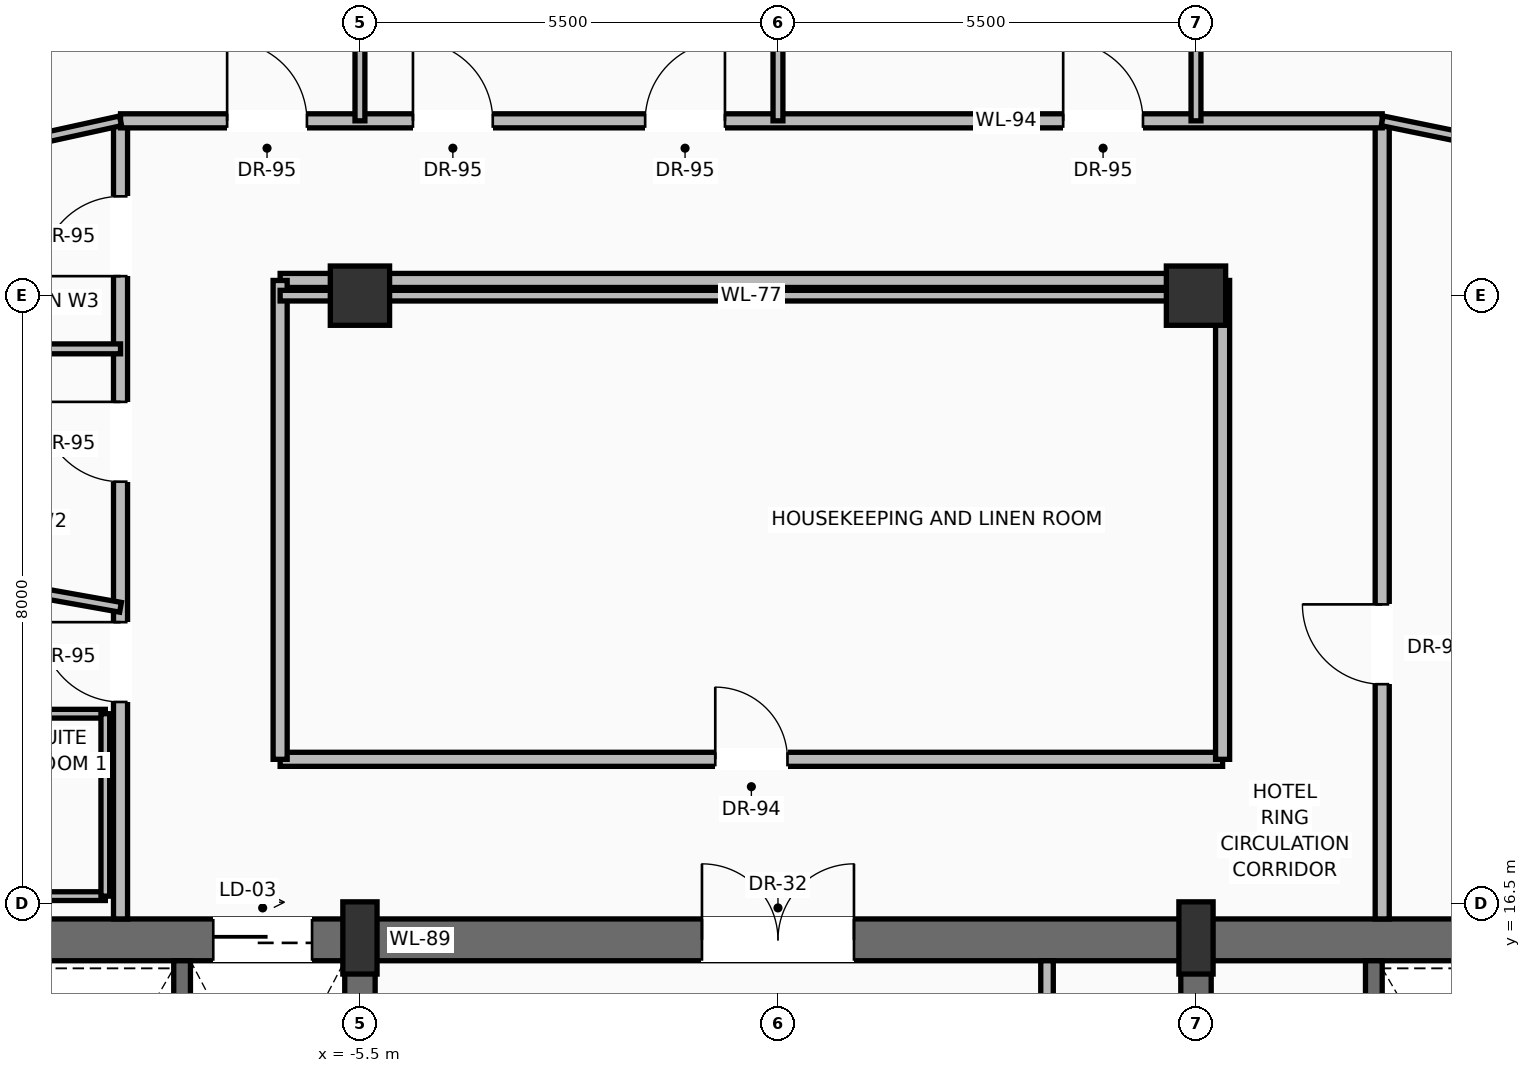
"""IFC4 building model, lengths in metres.
Left out: names, types, materials, properties, quantities, classifications, styles, units other than length and angle.
Written with IfcOpenShell. Run it as: python <this file> out.ifc"""

import sys

from ifc_helpers import new_model, si_unit, direction, frame, frame_2d, origin, origin_2d, place, context, subcontext, project, spatial, rectangle, extrude, source, transform, mapped, element, fill, save


model = new_model("IFC4")
c1 = context("Model", 3, precision=1e-05, world=origin(), true_north=direction((0.0, 1.0)))
c2 = subcontext(c1, "Body", "Model", "MODEL_VIEW")
j1 = project(units=[si_unit("LENGTHUNIT", "METRE"), si_unit("PLANEANGLEUNIT", "RADIAN")], contexts=[c1])
p1 = place(None, origin())
s1 = spatial("IfcSite", under=j1, at=p1, CompositionType="ELEMENT")
p2 = place(p1, origin())
s2 = spatial("IfcBuilding", under=s1, at=p2, CompositionType="ELEMENT")
p3 = place(p2, frame((0.0, 0.0, 233.8)))
s3 = spatial("IfcBuildingStorey", under=s2, at=p3, CompositionType="ELEMENT", Elevation=233.8)
p4 = place(p3, frame((-10.7, 16.025, 0.0), z_axis=(0.0, 0.0, 1.0), x_axis=(1.0, 0.0, 0.0)))
e1 = element("IfcWall", 1, at=p4, inside=s3, PredefinedType="SHEAR", context=c2, shape_type="SweptSolid", body=[
    extrude(rectangle(XDim=21.4, YDim=0.55, at=frame_2d((10.7, 0.0))), origin(), (0.0, 0.0, 1.0), 3.24),
])
p5 = place(p4, frame((3.27, 0.0, 0.0)))
e2 = element("IfcOpeningElement", 2, at=p5, cuts=e1, PredefinedType="OPENING", context=c2, shape_type="SweptSolid", body=[
    extrude(rectangle(XDim=1.3, YDim=2.3, at=frame_2d((0.65, 1.15))), frame((0.0, 0.285, 0.0), z_axis=(0.0, -1.0, 0.0), x_axis=(1.0, 0.0, 0.0)), (0.0, 0.0, 1.0), 0.57),
])
p6 = place(p4, frame((9.7, 0.0, 0.0)))
e3 = element("IfcOpeningElement", 3, at=p6, cuts=e1, PredefinedType="OPENING", context=c2, shape_type="SweptSolid", body=[
    extrude(rectangle(XDim=2.0, YDim=2.4, at=frame_2d((1.0, 1.2))), frame((0.0, 0.285, 0.0), z_axis=(0.0, -1.0, 0.0), x_axis=(1.0, 0.0, 0.0)), (0.0, 0.0, 1.0), 0.57),
])
p7 = place(p3, frame((-5.5, 0.575, 0.0), z_axis=(0.0, 0.0, 1.0), x_axis=(0.0, 1.0, 0.0)))
e4 = element("IfcWall", 4, at=p7, inside=s3, PredefinedType="SHEAR", context=c2, shape_type="SweptSolid", body=[
    extrude(rectangle(XDim=15.45, YDim=0.4, at=frame_2d((7.725, 0.0))), origin(), (0.0, 0.0, 1.0), 3.24),
])
p8 = place(p7, frame((8.925, 0.0, 0.0)))
e5 = element("IfcOpeningElement", 5, at=p8, cuts=e4, PredefinedType="OPENING", context=c2, shape_type="SweptSolid", body=[
    extrude(rectangle(XDim=1.1, YDim=2.2, at=frame_2d((0.55, 1.1))), frame((0.0, 0.21, 0.0), z_axis=(0.0, -1.0, 0.0), x_axis=(1.0, 0.0, 0.0)), (0.0, 0.0, 1.0), 0.42),
])
p9 = place(p3, frame((5.5, 0.575, 0.0), z_axis=(0.0, 0.0, 1.0), x_axis=(0.0, 1.0, 0.0)))
e6 = element("IfcWall", 6, at=p9, inside=s3, PredefinedType="SHEAR", context=c2, shape_type="SweptSolid", body=[
    extrude(rectangle(XDim=15.45, YDim=0.4, at=frame_2d((7.725, 0.0))), origin(), (0.0, 0.0, 1.0), 3.24),
])
p10 = place(p9, frame((8.925, 0.0, 0.0)))
e7 = element("IfcOpeningElement", 7, at=p10, cuts=e6, PredefinedType="OPENING", context=c2, shape_type="SweptSolid", body=[
    extrude(rectangle(XDim=1.1, YDim=2.2, at=frame_2d((0.55, 1.1))), frame((0.0, 0.21, 0.0), z_axis=(0.0, -1.0, 0.0), x_axis=(1.0, 0.0, 0.0)), (0.0, 0.0, 1.0), 0.42),
])
m1 = source(origin(), c2, "Body", "SweptSolid", [
    extrude(rectangle(XDim=0.45, YDim=0.95, at=origin_2d()), origin(), (0.0, 0.0, 1.0), 3.45),
])
for number, where, z_axis, x_axis in (
    (8, (-5.5, 16.05, 0.0), (0.0, 0.0, 1.0), (1.0, 0.0, 0.0)),
    (9, (5.5, 16.05, 0.0), (0.0, 0.0, 1.0), (1.0, 0.0, 0.0)),
):
    element("IfcColumn", number, at=place(p3, frame(where, z_axis=z_axis, x_axis=x_axis)), inside=s3, PredefinedType="PILASTER", context=c2, shape_type="MappedRepresentation", body=[
        mapped(m1, transform((0.0, 0.0, 0.0), scale=1.0)),
    ])
m2 = source(origin(), c2, "Body", "SweptSolid", [
    extrude(rectangle(XDim=0.78, YDim=0.78, at=origin_2d()), origin(), (0.0, 0.0, 1.0), 3.45),
])
for number, where, z_axis, x_axis in (
    (10, (-5.5, 24.5, 0.0), (0.0, 0.0, 1.0), (1.0, 0.0, 0.0)),
    (11, (5.5, 24.5, 0.0), (0.0, 0.0, 1.0), (1.0, 0.0, 0.0)),
):
    element("IfcColumn", number, at=place(p3, frame(where, z_axis=z_axis, x_axis=x_axis)), inside=s3, PredefinedType="COLUMN", context=c2, shape_type="MappedRepresentation", body=[
        mapped(m2, transform((0.0, 0.0, 0.0), scale=1.0)),
    ])
p11 = place(p3, frame((-19.509, 15.219, 0.0), z_axis=(0.0, 0.0, 1.0), x_axis=(0.509744081024, 0.860326084611, 0.0)))
e12 = element("IfcWall", 12, at=p11, inside=s3, PredefinedType="SOLIDWALL", context=c2, shape_type="SweptSolid", body=[
    extrude(rectangle(XDim=19.511, YDim=0.28, at=frame_2d((9.756, 0.0))), origin(), (0.0, 0.0, 1.0), 2.82),
])
p12 = place(p11, frame((4.683, 0.0, 0.0)))
e13 = element("IfcOpeningElement", 13, at=p12, cuts=e12, PredefinedType="OPENING", context=c2, shape_type="SweptSolid", body=[
    extrude(rectangle(XDim=1.6, YDim=2.35, at=frame_2d((0.8, 1.175))), frame((0.0, 0.15, 0.0), z_axis=(0.0, -1.0, 0.0), x_axis=(1.0, 0.0, 0.0)), (0.0, 0.0, 1.0), 0.3),
])
p13 = place(p11, frame((13.268, 0.0, 0.9)))
e14 = element("IfcOpeningElement", 14, at=p13, cuts=e12, PredefinedType="OPENING", context=c2, shape_type="SweptSolid", body=[
    extrude(rectangle(XDim=2.0, YDim=1.75, at=frame_2d((1.0, 0.875))), frame((0.0, 0.15, 0.0), z_axis=(0.0, -1.0, 0.0), x_axis=(1.0, 0.0, 0.0)), (0.0, 0.0, 1.0), 0.3),
])
p14 = place(p3, frame((8.625, 32.099, 0.0), z_axis=(0.0, 0.0, 1.0), x_axis=(0.526909754256, -0.849921238039, 0.0)))
e15 = element("IfcWall", 15, at=p14, inside=s3, PredefinedType="SOLIDWALL", context=c2, shape_type="SweptSolid", body=[
    extrude(rectangle(XDim=19.572, YDim=0.28, at=frame_2d((9.786, 0.0))), origin(), (0.0, 0.0, 1.0), 2.82),
])
p15 = place(p14, frame((4.697, 0.0, 0.0)))
e16 = element("IfcOpeningElement", 16, at=p15, cuts=e15, PredefinedType="OPENING", context=c2, shape_type="SweptSolid", body=[
    extrude(rectangle(XDim=1.6, YDim=2.35, at=frame_2d((0.8, 1.175))), frame((0.0, 0.15, 0.0), z_axis=(0.0, -1.0, 0.0), x_axis=(1.0, 0.0, 0.0)), (0.0, 0.0, 1.0), 0.3),
])
p16 = place(p14, frame((13.309, 0.0, 0.9)))
e17 = element("IfcOpeningElement", 17, at=p16, cuts=e15, PredefinedType="OPENING", context=c2, shape_type="SweptSolid", body=[
    extrude(rectangle(XDim=2.0, YDim=1.75, at=frame_2d((1.0, 0.875))), frame((0.0, 0.15, 0.0), z_axis=(0.0, -1.0, 0.0), x_axis=(1.0, 0.0, 0.0)), (0.0, 0.0, 1.0), 0.3),
])
for number, where, z_axis, x_axis in (
    (18, (-7.84, 11.87, 0.0), (0.0, 0.0, 1.0), (0.0, 1.0, 0.0)),
    (19, (7.84, 11.87, 0.0), (0.0, 0.0, 1.0), (0.0, 1.0, 0.0)),
):
    element("IfcWall", number, at=place(p3, frame(where, z_axis=z_axis, x_axis=x_axis)), inside=s3, PredefinedType="SOLIDWALL", context=c2, shape_type="SweptSolid", body=[
        extrude(rectangle(XDim=3.88, YDim=0.22, at=frame_2d((1.94, 0.0))), origin(), (0.0, 0.0, 1.0), 3.24),
    ])
p17 = place(p3, frame((3.54, 11.22, 0.0), z_axis=(0.0, 0.0, 1.0), x_axis=(0.0, 1.0, 0.0)))
e20 = element("IfcWall", 20, at=p17, inside=s3, PredefinedType="PARTITIONING", context=c2, shape_type="SweptSolid", body=[
    extrude(rectangle(XDim=4.53, YDim=0.165, at=frame_2d((2.265, 0.0))), origin(), (0.0, 0.0, 1.0), 3.232),
])
p18 = place(p17, frame((1.25, 0.0, 0.0)))
e21 = element("IfcOpeningElement", 21, at=p18, cuts=e20, PredefinedType="OPENING", context=c2, shape_type="SweptSolid", body=[
    extrude(rectangle(XDim=0.9, YDim=2.1, at=frame_2d((0.45, 1.05))), frame((0.0, 0.093, 0.0), z_axis=(0.0, -1.0, 0.0), x_axis=(1.0, 0.0, 0.0)), (0.0, 0.0, 1.0), 0.185),
])
p19 = place(p3, frame((-6.55, 18.4, 0.0), z_axis=(0.0, 0.0, 1.0), x_axis=(1.0, 0.0, 0.0)))
e22 = element("IfcWall", 22, at=p19, inside=s3, PredefinedType="PARTITIONING", context=c2, shape_type="SweptSolid", body=[
    extrude(rectangle(XDim=12.4, YDim=0.185, at=frame_2d((6.2, 0.0))), origin(), (0.0, 0.0, 1.0), 3.232),
])
p20 = place(p19, frame((5.725, 0.0, 0.0)))
e23 = element("IfcOpeningElement", 23, at=p20, cuts=e22, PredefinedType="OPENING", context=c2, shape_type="SweptSolid", body=[
    extrude(rectangle(XDim=0.95, YDim=2.2, at=frame_2d((0.475, 1.1))), frame((0.0, 0.103, 0.0), z_axis=(0.0, -1.0, 0.0), x_axis=(1.0, 0.0, 0.0)), (0.0, 0.0, 1.0), 0.205),
])
p21 = place(p3, frame((-6.55, 24.7, 0.0), z_axis=(0.0, 0.0, 1.0), x_axis=(1.0, 0.0, 0.0)))
e24 = element("IfcWall", 24, at=p21, inside=s3, PredefinedType="PARTITIONING", context=c2, shape_type="SweptSolid", body=[
    extrude(rectangle(XDim=12.4, YDim=0.185, at=frame_2d((6.2, 0.0))), origin(), (0.0, 0.0, 1.0), 2.683),
])
for number, where, z_axis, x_axis in (
    (25, (-6.55, 18.4, 0.0), (0.0, 0.0, 1.0), (0.0, 1.0, 0.0)),
    (26, (5.85, 18.4, 0.0), (0.0, 0.0, 1.0), (0.0, 1.0, 0.0)),
):
    element("IfcWall", number, at=place(p3, frame(where, z_axis=z_axis, x_axis=x_axis)), inside=s3, PredefinedType="PARTITIONING", context=c2, shape_type="SweptSolid", body=[
        extrude(rectangle(XDim=6.3, YDim=0.185, at=frame_2d((3.15, 0.0))), origin(), (0.0, 0.0, 1.0), 3.232),
    ])
p22 = place(p3, frame((-8.65, 16.3, 0.0), z_axis=(0.0, 0.0, 1.0), x_axis=(0.0, 1.0, 0.0)))
e27 = element("IfcWall", 27, at=p22, inside=s3, PredefinedType="PARTITIONING", context=c2, shape_type="SweptSolid", body=[
    extrude(rectangle(XDim=10.5, YDim=0.185, at=frame_2d((5.25, 0.0))), origin(), (0.0, 0.0, 1.0), 3.232),
])
p23 = place(p22, frame((2.854, 0.0, 0.0)))
e28 = element("IfcOpeningElement", 28, at=p23, cuts=e27, PredefinedType="OPENING", context=c2, shape_type="SweptSolid", body=[
    extrude(rectangle(XDim=1.05, YDim=2.25, at=frame_2d((0.525, 1.125))), frame((0.0, 0.103, 0.0), z_axis=(0.0, -1.0, 0.0), x_axis=(1.0, 0.0, 0.0)), (0.0, 0.0, 1.0), 0.205),
])
p24 = place(p22, frame((5.752, 0.0, 0.0)))
e29 = element("IfcOpeningElement", 29, at=p24, cuts=e27, PredefinedType="OPENING", context=c2, shape_type="SweptSolid", body=[
    extrude(rectangle(XDim=1.05, YDim=2.25, at=frame_2d((0.525, 1.125))), frame((0.0, 0.103, 0.0), z_axis=(0.0, -1.0, 0.0), x_axis=(1.0, 0.0, 0.0)), (0.0, 0.0, 1.0), 0.205),
])
p25 = place(p22, frame((8.457, 0.0, 0.0)))
e30 = element("IfcOpeningElement", 30, at=p25, cuts=e27, PredefinedType="OPENING", context=c2, shape_type="SweptSolid", body=[
    extrude(rectangle(XDim=1.05, YDim=2.25, at=frame_2d((0.525, 1.125))), frame((0.0, 0.103, 0.0), z_axis=(0.0, -1.0, 0.0), x_axis=(1.0, 0.0, 0.0)), (0.0, 0.0, 1.0), 0.205),
])
p26 = place(p3, frame((7.95, 16.3, 0.0), z_axis=(0.0, 0.0, 1.0), x_axis=(0.0, 1.0, 0.0)))
e31 = element("IfcWall", 31, at=p26, inside=s3, PredefinedType="PARTITIONING", context=c2, shape_type="SweptSolid", body=[
    extrude(rectangle(XDim=10.5, YDim=0.185, at=frame_2d((5.25, 0.0))), origin(), (0.0, 0.0, 1.0), 3.232),
])
p27 = place(p26, frame((3.088, 0.0, 0.0)))
e32 = element("IfcOpeningElement", 32, at=p27, cuts=e31, PredefinedType="OPENING", context=c2, shape_type="SweptSolid", body=[
    extrude(rectangle(XDim=1.05, YDim=2.25, at=frame_2d((0.525, 1.125))), frame((0.0, 0.103, 0.0), z_axis=(0.0, -1.0, 0.0), x_axis=(1.0, 0.0, 0.0)), (0.0, 0.0, 1.0), 0.205),
])
p28 = place(p3, frame((-8.65, 26.8, 0.0), z_axis=(0.0, 0.0, 1.0), x_axis=(1.0, 0.0, 0.0)))
e33 = element("IfcWall", 33, at=p28, inside=s3, PredefinedType="PARTITIONING", context=c2, shape_type="SweptSolid", body=[
    extrude(rectangle(XDim=16.6, YDim=0.185, at=frame_2d((8.3, 0.0))), origin(), (0.0, 0.0, 1.0), 3.232),
])
p29 = place(p28, frame((3.847, 0.0, 0.0)))
e34 = element("IfcOpeningElement", 34, at=p29, cuts=e33, PredefinedType="OPENING", context=c2, shape_type="SweptSolid", body=[
    extrude(rectangle(XDim=1.05, YDim=2.25, at=frame_2d((0.525, 1.125))), frame((0.0, 0.103, 0.0), z_axis=(0.0, -1.0, 0.0), x_axis=(1.0, 0.0, 0.0)), (0.0, 0.0, 1.0), 0.205),
])
p30 = place(p28, frame((6.903, 0.0, 0.0)))
e35 = element("IfcOpeningElement", 35, at=p30, cuts=e33, PredefinedType="OPENING", context=c2, shape_type="SweptSolid", body=[
    extrude(rectangle(XDim=1.05, YDim=2.25, at=frame_2d((0.525, 1.125))), frame((0.0, 0.103, 0.0), z_axis=(0.0, -1.0, 0.0), x_axis=(1.0, 0.0, 0.0)), (0.0, 0.0, 1.0), 0.205),
])
p31 = place(p28, frame((12.403, 0.0, 0.0)))
e36 = element("IfcOpeningElement", 36, at=p31, cuts=e33, PredefinedType="OPENING", context=c2, shape_type="SweptSolid", body=[
    extrude(rectangle(XDim=1.05, YDim=2.25, at=frame_2d((0.525, 1.125))), frame((0.0, 0.103, 0.0), z_axis=(0.0, -1.0, 0.0), x_axis=(1.0, 0.0, 0.0)), (0.0, 0.0, 1.0), 0.205),
])
p32 = place(p28, frame((1.403, 0.0, 0.0)))
e37 = element("IfcOpeningElement", 37, at=p32, cuts=e33, PredefinedType="OPENING", context=c2, shape_type="SweptSolid", body=[
    extrude(rectangle(XDim=1.05, YDim=2.25, at=frame_2d((0.525, 1.125))), frame((0.0, 0.103, 0.0), z_axis=(0.0, -1.0, 0.0), x_axis=(1.0, 0.0, 0.0)), (0.0, 0.0, 1.0), 0.205),
])
p33 = place(p3, frame((-6.55, 24.5, 0.0), z_axis=(0.0, 0.0, 1.0), x_axis=(1.0, 0.0, 0.0)))
e38 = element("IfcWall", 38, at=p33, inside=s3, PredefinedType="PARTITIONING", context=c2, shape_type="SweptSolid", body=[
    extrude(rectangle(XDim=12.4, YDim=0.14, at=frame_2d((6.2, 0.0))), origin(), (0.0, 0.0, 1.0), 2.683),
])
p34 = place(p3, frame((-13.418, 25.753, 0.0), z_axis=(0.0, 0.0, 1.0), x_axis=(0.976739234334, 0.214430567112, 0.0)))
e39 = element("IfcWall", 39, at=p34, inside=s3, PredefinedType="PARTITIONING", context=c2, shape_type="SweptSolid", body=[
    extrude(rectangle(XDim=4.882, YDim=0.13, at=frame_2d((2.441, 0.0))), origin(), (0.0, 0.0, 1.0), 3.232),
])
p35 = place(p3, frame((7.95, 26.8, 0.0), z_axis=(0.0, 0.0, 1.0), x_axis=(0.979737591197, -0.200285427317, 0.0)))
e40 = element("IfcWall", 40, at=p35, inside=s3, PredefinedType="PARTITIONING", context=c2, shape_type="SweptSolid", body=[
    extrude(rectangle(XDim=4.806, YDim=0.13, at=frame_2d((2.403, 0.0))), origin(), (0.0, 0.0, 1.0), 3.232),
])
p36 = place(p35, frame((1.887, 0.0, 0.0)))
e41 = element("IfcOpeningElement", 41, at=p36, cuts=e40, PredefinedType="OPENING", context=c2, shape_type="SweptSolid", body=[
    extrude(rectangle(XDim=0.95, YDim=2.2, at=frame_2d((0.475, 1.1))), frame((0.0, 0.075, 0.0), z_axis=(0.0, -1.0, 0.0), x_axis=(1.0, 0.0, 0.0)), (0.0, 0.0, 1.0), 0.15),
])
p37 = place(p3, frame((-5.5, 26.8, 0.0), z_axis=(0.0, 0.0, 1.0), x_axis=(0.0, 1.0, 0.0)))
e42 = element("IfcWall", 42, at=p37, inside=s3, PredefinedType="PARTITIONING", context=c2, shape_type="SweptSolid", body=[
    extrude(rectangle(XDim=12.318, YDim=0.13, at=frame_2d((6.159, 0.0))), origin(), (0.0, 0.0, 1.0), 2.683),
])
p38 = place(p3, frame((5.5, 26.8, 0.0), z_axis=(0.0, 0.0, 1.0), x_axis=(0.0, 1.0, 0.0)))
e43 = element("IfcWall", 43, at=p38, inside=s3, PredefinedType="PARTITIONING", context=c2, shape_type="SweptSolid", body=[
    extrude(rectangle(XDim=10.585, YDim=0.13, at=frame_2d((5.292, 0.0))), origin(), (0.0, 0.0, 1.0), 2.683),
])
p39 = place(p3, frame((0.0, 26.8, 0.0), z_axis=(0.0, 0.0, 1.0), x_axis=(0.0, 1.0, 0.0)))
e44 = element("IfcWall", 44, at=p39, inside=s3, PredefinedType="PARTITIONING", context=c2, shape_type="SweptSolid", body=[
    extrude(rectangle(XDim=15.948, YDim=0.13, at=frame_2d((7.974, 0.0))), origin(), (0.0, 0.0, 1.0), 3.232),
])
for number, where, z_axis, x_axis in (
    (45, (-11.5, 16.6, 0.0), (0.0, 0.0, 1.0), (1.0, 0.0, 0.0)),
    (46, (-11.5, 19.0, 0.0), (0.0, 0.0, 1.0), (1.0, 0.0, 0.0)),
):
    element("IfcWall", number, at=place(p3, frame(where, z_axis=z_axis, x_axis=x_axis)), inside=s3, PredefinedType="PARTITIONING", context=c2, shape_type="SweptSolid", body=[
        extrude(rectangle(XDim=2.65, YDim=0.115, at=frame_2d((1.325, 0.0))), origin(), (0.0, 0.0, 1.0), 3.232),
    ])
p40 = place(p3, frame((-8.85, 16.6, 0.0), z_axis=(0.0, 0.0, 1.0), x_axis=(0.0, 1.0, 0.0)))
e47 = element("IfcWall", 47, at=p40, inside=s3, PredefinedType="PARTITIONING", context=c2, shape_type="SweptSolid", body=[
    extrude(rectangle(XDim=2.4, YDim=0.115, at=frame_2d((1.2, 0.0))), origin(), (0.0, 0.0, 1.0), 3.232),
])
p41 = place(p3, frame((-15.832, 21.68, 0.0), z_axis=(0.0, 0.0, 1.0), x_axis=(0.984492454021, -0.175426930586, 0.0)))
e48 = element("IfcWall", 48, at=p41, inside=s3, PredefinedType="PARTITIONING", context=c2, shape_type="SweptSolid", body=[
    extrude(rectangle(XDim=7.295, YDim=0.13, at=frame_2d((3.647, 0.0))), origin(), (0.0, 0.0, 1.0), 3.232),
])
p42 = place(p3, frame((-14.576, 23.8, 0.0), z_axis=(0.0, 0.0, 1.0), x_axis=(1.0, 0.0, 0.0)))
e49 = element("IfcWall", 49, at=p42, inside=s3, PredefinedType="PARTITIONING", context=c2, shape_type="SweptSolid", body=[
    extrude(rectangle(XDim=5.926, YDim=0.13, at=frame_2d((2.963, 0.0))), origin(), (0.0, 0.0, 1.0), 3.232),
])
m3 = source(origin(), c2, "Body", "SweptSolid", [
    extrude(rectangle(XDim=1.3, YDim=2.3, at=frame_2d((0.65, 1.15))), frame((0.0, 0.025, 0.0), z_axis=(0.0, -1.0, 0.0), x_axis=(1.0, 0.0, 0.0)), (0.0, 0.0, 1.0), 0.05),
])
p43 = place(p5, origin())
e50 = element("IfcDoor", 50, at=p43, inside=s3, OperationType="SLIDING_TO_RIGHT", PredefinedType="DOOR", context=c2, shape_type="MappedRepresentation", body=[
    mapped(m3, transform((0.0, 0.0, 0.0), scale=1.0)),
])
fill(e2, e50)
m4 = source(origin(), c2, "Body", "SweptSolid", [
    extrude(rectangle(XDim=2.0, YDim=2.4, at=frame_2d((1.0, 1.2))), frame((0.0, 0.025, 0.0), z_axis=(0.0, -1.0, 0.0), x_axis=(1.0, 0.0, 0.0)), (0.0, 0.0, 1.0), 0.05),
])
p44 = place(p6, origin())
e51 = element("IfcDoor", 51, at=p44, inside=s3, OperationType="DOUBLE_DOOR_SINGLE_SWING", PredefinedType="DOOR", context=c2, shape_type="MappedRepresentation", body=[
    mapped(m4, transform((0.0, 0.0, 0.0), scale=1.0)),
])
fill(e3, e51)
m5 = source(origin(), c2, "Body", "SweptSolid", [
    extrude(rectangle(XDim=0.95, YDim=2.2, at=frame_2d((0.475, 1.1))), frame((0.0, 0.025, 0.0), z_axis=(0.0, -1.0, 0.0), x_axis=(1.0, 0.0, 0.0)), (0.0, 0.0, 1.0), 0.05),
])
p45 = place(p20, origin())
e52 = element("IfcDoor", 52, at=p45, inside=s3, OperationType="SINGLE_SWING_LEFT", PredefinedType="DOOR", context=c2, shape_type="MappedRepresentation", body=[
    mapped(m5, transform((0.0, 0.0, 0.0), scale=1.0)),
])
fill(e23, e52)
m6 = source(origin(), c2, "Body", "SweptSolid", [
    extrude(rectangle(XDim=1.05, YDim=2.25, at=frame_2d((0.525, 1.125))), frame((0.0, 0.025, 0.0), z_axis=(0.0, -1.0, 0.0), x_axis=(1.0, 0.0, 0.0)), (0.0, 0.0, 1.0), 0.05),
])
p46 = place(p23, origin())
e53 = element("IfcDoor", 53, at=p46, inside=s3, OperationType="SINGLE_SWING_RIGHT", PredefinedType="DOOR", context=c2, shape_type="MappedRepresentation", body=[
    mapped(m6, transform((0.0, 0.0, 0.0), scale=1.0)),
])
fill(e28, e53)
p47 = place(p24, origin())
e54 = element("IfcDoor", 54, at=p47, inside=s3, OperationType="SINGLE_SWING_RIGHT", PredefinedType="DOOR", context=c2, shape_type="MappedRepresentation", body=[
    mapped(m6, transform((0.0, 0.0, 0.0), scale=1.0)),
])
fill(e29, e54)
p48 = place(p25, origin())
e55 = element("IfcDoor", 55, at=p48, inside=s3, OperationType="SINGLE_SWING_LEFT", PredefinedType="DOOR", context=c2, shape_type="MappedRepresentation", body=[
    mapped(m6, transform((0.0, 0.0, 0.0), scale=1.0)),
])
fill(e30, e55)
p49 = place(p27, origin())
e56 = element("IfcDoor", 56, at=p49, inside=s3, OperationType="SINGLE_SWING_RIGHT", PredefinedType="DOOR", context=c2, shape_type="MappedRepresentation", body=[
    mapped(m6, transform((0.0, 0.0, 0.0), scale=1.0)),
])
fill(e32, e56)
p50 = place(p29, origin())
e57 = element("IfcDoor", 57, at=p50, inside=s3, OperationType="SINGLE_SWING_LEFT", PredefinedType="DOOR", context=c2, shape_type="MappedRepresentation", body=[
    mapped(m6, transform((0.0, 0.0, 0.0), scale=1.0)),
])
fill(e34, e57)
p51 = place(p30, origin())
e58 = element("IfcDoor", 58, at=p51, inside=s3, OperationType="SINGLE_SWING_RIGHT", PredefinedType="DOOR", context=c2, shape_type="MappedRepresentation", body=[
    mapped(m6, transform((0.0, 0.0, 0.0), scale=1.0)),
])
fill(e35, e58)
p52 = place(p31, origin())
e59 = element("IfcDoor", 59, at=p52, inside=s3, OperationType="SINGLE_SWING_LEFT", PredefinedType="DOOR", context=c2, shape_type="MappedRepresentation", body=[
    mapped(m6, transform((0.0, 0.0, 0.0), scale=1.0)),
])
fill(e36, e59)
p53 = place(p32, origin())
e60 = element("IfcDoor", 60, at=p53, inside=s3, OperationType="SINGLE_SWING_LEFT", PredefinedType="DOOR", context=c2, shape_type="MappedRepresentation", body=[
    mapped(m6, transform((0.0, 0.0, 0.0), scale=1.0)),
])
fill(e37, e60)
save(model, sys.argv[1])
